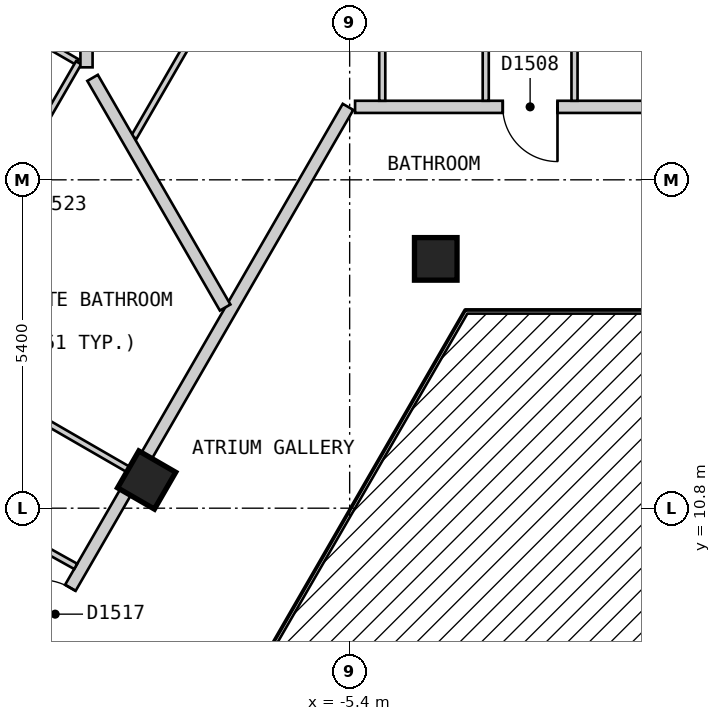
"""IFC4 building model, lengths in metres.
Left out: names, types, materials, properties, quantities, classifications, styles, units other than length and angle.
Written with IfcOpenShell. Run it as: python <this file> out.ifc"""

import sys

from ifc_helpers import new_model, si_unit, direction, frame, frame_2d, origin, origin_2d, place, context, subcontext, project, spatial, rectangle, extrude, element, fill, save


model = new_model("IFC4")
c1 = context("Model", 3, precision=1e-05, world=origin(), true_north=direction((0.0, 1.0)))
c2 = subcontext(c1, "Body", "Model", "MODEL_VIEW")
j1 = project(units=[si_unit("LENGTHUNIT", "METRE"), si_unit("PLANEANGLEUNIT", "RADIAN")], contexts=[c1])
p1 = place(None, origin())
s1 = spatial("IfcSite", under=j1, at=p1, CompositionType="ELEMENT")
p2 = place(p1, origin())
s2 = spatial("IfcBuilding", under=s1, at=p2, CompositionType="ELEMENT")
p3 = place(p2, frame((0.0, 0.0, 196.2)))
s3 = spatial("IfcBuildingStorey", under=s2, at=p3, CompositionType="ELEMENT", Elevation=196.2)
for number, where, z_axis, x_axis in (
    (1, (-3.984, 14.9, 0.0), (0.0, 0.0, 1.0), (1.0, 0.0, 0.0)),
    (2, (-8.739, 11.263, 0.0), (0.0, 0.0, 1.0), (-0.5, -0.866, 0.0)),
):
    element("IfcColumn", number, at=place(p3, frame(where, z_axis=z_axis, x_axis=x_axis)), inside=s3, PredefinedType="COLUMN", context=c2, shape_type="SweptSolid", body=[
        extrude(rectangle(XDim=0.7, YDim=0.7, at=origin_2d()), origin(), (0.0, 0.0, 1.0), 3.0),
    ])
p4 = place(p3, frame((-5.311, 17.4, 0.0), z_axis=(0.0, 0.0, 1.0), x_axis=(1.0, 0.0, 0.0)))
e3 = element("IfcWall", 3, at=p4, inside=s3, PredefinedType="PARTITIONING", context=c2, shape_type="SweptSolid", body=[
    extrude(rectangle(XDim=10.737, YDim=0.2, at=frame_2d((5.369, 0.0))), origin(), (0.0, 0.0, 1.0), 2.6),
])
p5 = place(p4, frame((2.429, 0.0, 0.0)))
e4 = element("IfcOpeningElement", 4, at=p5, cuts=e3, PredefinedType="OPENING", context=c2, shape_type="SweptSolid", body=[
    extrude(rectangle(XDim=0.9, YDim=2.1, at=frame_2d((0.45, 1.05))), frame((0.0, 0.11, 0.0), z_axis=(0.0, -1.0, 0.0), x_axis=(1.0, 0.0, 0.0)), (0.0, 0.0, 1.0), 0.22),
])
p6 = place(p3, frame((-10.854, 8.0, 0.0), z_axis=(0.0, 0.0, 1.0), x_axis=(0.499997637144, 0.866026767976, 0.0)))
e5 = element("IfcWall", 5, at=p6, inside=s3, PredefinedType="PARTITIONING", context=c2, shape_type="SweptSolid", body=[
    extrude(rectangle(XDim=10.854, YDim=0.2, at=frame_2d((5.427, 0.0))), origin(), (0.0, 0.0, 1.0), 2.6),
])
p7 = place(p6, frame((0.721, 0.0, 0.0)))
e6 = element("IfcOpeningElement", 6, at=p7, cuts=e5, PredefinedType="OPENING", context=c2, shape_type="SweptSolid", body=[
    extrude(rectangle(XDim=1.0, YDim=2.1, at=frame_2d((0.5, 1.05))), frame((0.0, 0.11, 0.0), z_axis=(0.0, -1.0, 0.0), x_axis=(1.0, 0.0, 0.0)), (0.0, 0.0, 1.0), 0.22),
])
p8 = place(p3, frame((-1.702, 20.409, 0.0), z_axis=(0.0, 0.0, 1.0), x_axis=(0.0, -1.0, 0.0)))
e7 = element("IfcWall", 7, at=p8, inside=s3, PredefinedType="PARTITIONING", context=c2, shape_type="SweptSolid", body=[
    extrude(rectangle(XDim=2.909, YDim=0.1, at=frame_2d((1.455, 0.0))), origin(), (0.0, 0.0, 1.0), 2.6),
])
p9 = place(p8, frame((1.029, 0.0, 0.0)))
e8 = element("IfcOpeningElement", 8, at=p9, cuts=e7, PredefinedType="OPENING", context=c2, shape_type="SweptSolid", body=[
    extrude(rectangle(XDim=0.9, YDim=2.1, at=frame_2d((0.45, 1.05))), frame((0.0, 0.06, 0.0), z_axis=(0.0, -1.0, 0.0), x_axis=(1.0, 0.0, 0.0)), (0.0, 0.0, 1.0), 0.12),
])
p10 = place(p3, frame((-13.444, 11.814, 0.0), z_axis=(0.0, 0.0, 1.0), x_axis=(0.873653620945, -0.486548405207, 0.0)))
e9 = element("IfcWall", 9, at=p10, inside=s3, PredefinedType="PARTITIONING", context=c2, shape_type="SweptSolid", body=[
    extrude(rectangle(XDim=4.051, YDim=0.1, at=frame_2d((2.025, 0.0))), origin(), (0.0, 0.0, 1.0), 2.6),
])
p11 = place(p10, frame((1.6, 0.0, 0.0)))
e10 = element("IfcOpeningElement", 10, at=p11, cuts=e9, PredefinedType="OPENING", context=c2, shape_type="SweptSolid", body=[
    extrude(rectangle(XDim=0.9, YDim=2.1, at=frame_2d((0.45, 1.05))), frame((0.0, 0.06, 0.0), z_axis=(0.0, -1.0, 0.0), x_axis=(1.0, 0.0, 0.0)), (0.0, 0.0, 1.0), 0.12),
])
p12 = place(p3, frame((-14.794, 20.975, 0.0), z_axis=(0.0, 0.0, 1.0), x_axis=(0.865989811779, -0.500061642096, 0.0)))
e11 = element("IfcWall", 11, at=p12, inside=s3, PredefinedType="PARTITIONING", context=c2, shape_type="SweptSolid", body=[
    extrude(rectangle(XDim=5.67, YDim=0.1, at=frame_2d((2.835, 0.0))), origin(), (0.0, 0.0, 1.0), 2.6),
])
p13 = place(p12, frame((2.41, 0.0, 0.0)))
e12 = element("IfcOpeningElement", 12, at=p13, cuts=e11, PredefinedType="OPENING", context=c2, shape_type="SweptSolid", body=[
    extrude(rectangle(XDim=0.9, YDim=2.1, at=frame_2d((0.45, 1.05))), frame((0.0, 0.06, 0.0), z_axis=(0.0, -1.0, 0.0), x_axis=(1.0, 0.0, 0.0)), (0.0, 0.0, 1.0), 0.12),
])
p14 = place(p3, frame((-8.949, 16.9, 0.0), z_axis=(0.0, 0.0, 1.0), x_axis=(0.499949850951, 0.866054355415, 0.0)))
e13 = element("IfcWall", 13, at=p14, inside=s3, PredefinedType="PARTITIONING", context=c2, shape_type="SweptSolid", body=[
    extrude(rectangle(XDim=3.811, YDim=0.1, at=frame_2d((1.905, 0.0))), origin(), (0.0, 0.0, 1.0), 2.6),
])
p15 = place(p14, frame((1.992, 0.0, 0.0)))
e14 = element("IfcOpeningElement", 14, at=p15, cuts=e13, PredefinedType="OPENING", context=c2, shape_type="SweptSolid", body=[
    extrude(rectangle(XDim=0.8, YDim=2.1, at=frame_2d((0.4, 1.05))), frame((0.0, 0.06, 0.0), z_axis=(0.0, -1.0, 0.0), x_axis=(1.0, 0.0, 0.0)), (0.0, 0.0, 1.0), 0.12),
])
p16 = place(p3, frame((-15.192, 8.887, 0.0), z_axis=(0.0, 0.0, 1.0), x_axis=(0.500028204665, 0.866009119201, 0.0)))
e15 = element("IfcWall", 15, at=p16, inside=s3, PredefinedType="PARTITIONING", context=c2, shape_type="SweptSolid", body=[
    extrude(rectangle(XDim=10.667, YDim=0.1, at=frame_2d((5.334, 0.0))), origin(), (0.0, 0.0, 1.0), 2.6),
])
p17 = place(p16, frame((2.108, 0.0, 0.0)))
e16 = element("IfcOpeningElement", 16, at=p17, cuts=e15, PredefinedType="OPENING", context=c2, shape_type="SweptSolid", body=[
    extrude(rectangle(XDim=0.9, YDim=2.1, at=frame_2d((0.45, 1.05))), frame((0.0, 0.06, 0.0), z_axis=(0.0, -1.0, 0.0), x_axis=(1.0, 0.0, 0.0)), (0.0, 0.0, 1.0), 0.12),
])
p18 = place(p16, frame((7.576, 0.0, 0.0)))
e17 = element("IfcOpeningElement", 17, at=p18, cuts=e15, PredefinedType="OPENING", context=c2, shape_type="SweptSolid", body=[
    extrude(rectangle(XDim=0.8, YDim=2.1, at=frame_2d((0.4, 1.05))), frame((0.0, 0.06, 0.0), z_axis=(0.0, -1.0, 0.0), x_axis=(1.0, 0.0, 0.0)), (0.0, 0.0, 1.0), 0.12),
])
p19 = place(p3, frame((-3.162, 17.5, 0.0), z_axis=(0.0, 0.0, 1.0), x_axis=(0.0, 1.0, 0.0)))
e18 = element("IfcWall", 18, at=p19, inside=s3, PredefinedType="PARTITIONING", context=c2, shape_type="SweptSolid", body=[
    extrude(rectangle(XDim=2.91, YDim=0.1, at=frame_2d((1.455, 0.0))), origin(), (0.0, 0.0, 1.0), 2.6),
])
p20 = place(p19, frame((1.03, 0.0, 0.0)))
e19 = element("IfcOpeningElement", 19, at=p20, cuts=e18, PredefinedType="OPENING", context=c2, shape_type="SweptSolid", body=[
    extrude(rectangle(XDim=0.8, YDim=2.1, at=frame_2d((0.4, 1.05))), frame((0.0, 0.06, 0.0), z_axis=(0.0, -1.0, 0.0), x_axis=(1.0, 0.0, 0.0)), (0.0, 0.0, 1.0), 0.12),
])
p21 = place(p3, frame((-4.864, 17.5, 0.0), z_axis=(0.0, 0.0, 1.0), x_axis=(0.0, 1.0, 0.0)))
e20 = element("IfcWall", 20, at=p21, inside=s3, PredefinedType="PARTITIONING", context=c2, shape_type="SweptSolid", body=[
    extrude(rectangle(XDim=2.98, YDim=0.1, at=frame_2d((1.49, 0.0))), origin(), (0.0, 0.0, 1.0), 2.6),
])
p22 = place(p3, frame((-9.628, 17.877, 0.0), z_axis=(0.0, 0.0, 1.0), x_axis=(0.499890461358, -0.866088636713, 0.0)))
e21 = element("IfcWall", 21, at=p22, inside=s3, PredefinedType="PARTITIONING", context=c2, shape_type="SweptSolid", body=[
    extrude(rectangle(XDim=4.361, YDim=0.2, at=frame_2d((2.18, 0.0))), origin(), (0.0, 0.0, 1.0), 2.6),
])
p23 = place(p3, frame((-9.728, 18.05, 0.0), z_axis=(0.0, 0.0, 1.0), x_axis=(0.0, 1.0, 0.0)))
e22 = element("IfcWall", 22, at=p23, inside=s3, PredefinedType="PARTITIONING", context=c2, shape_type="SweptSolid", body=[
    extrude(rectangle(XDim=5.85, YDim=0.2, at=frame_2d((2.925, 0.0))), origin(), (0.0, 0.0, 1.0), 2.6),
])
p24 = place(p3, frame((-12.55, 13.463, 0.0), z_axis=(0.0, 0.0, 1.0), x_axis=(0.86606561423, -0.499930346997, 0.0)))
e23 = element("IfcWall", 23, at=p24, inside=s3, PredefinedType="PARTITIONING", context=c2, shape_type="SweptSolid", body=[
    extrude(rectangle(XDim=4.1, YDim=0.1, at=frame_2d((2.05, 0.0))), origin(), (0.0, 0.0, 1.0), 2.6),
])
p25 = place(p5, origin())
e24 = element("IfcDoor", 24, at=p25, inside=s3, OperationType="SINGLE_SWING_RIGHT", PredefinedType="DOOR", context=c2, shape_type="SweptSolid", body=[
    extrude(rectangle(XDim=0.9, YDim=2.1, at=frame_2d((0.45, 1.05))), frame((0.0, 0.025, 0.0), z_axis=(0.0, -1.0, 0.0), x_axis=(1.0, 0.0, 0.0)), (0.0, 0.0, 1.0), 0.05),
])
fill(e4, e24)
p26 = place(p7, origin())
e25 = element("IfcDoor", 25, at=p26, inside=s3, OperationType="SINGLE_SWING_LEFT", PredefinedType="DOOR", context=c2, shape_type="SweptSolid", body=[
    extrude(rectangle(XDim=1.0, YDim=2.1, at=frame_2d((0.5, 1.05))), frame((0.0, 0.025, 0.0), z_axis=(0.0, -1.0, 0.0), x_axis=(1.0, 0.0, 0.0)), (0.0, 0.0, 1.0), 0.05),
])
fill(e6, e25)
save(model, sys.argv[1])
